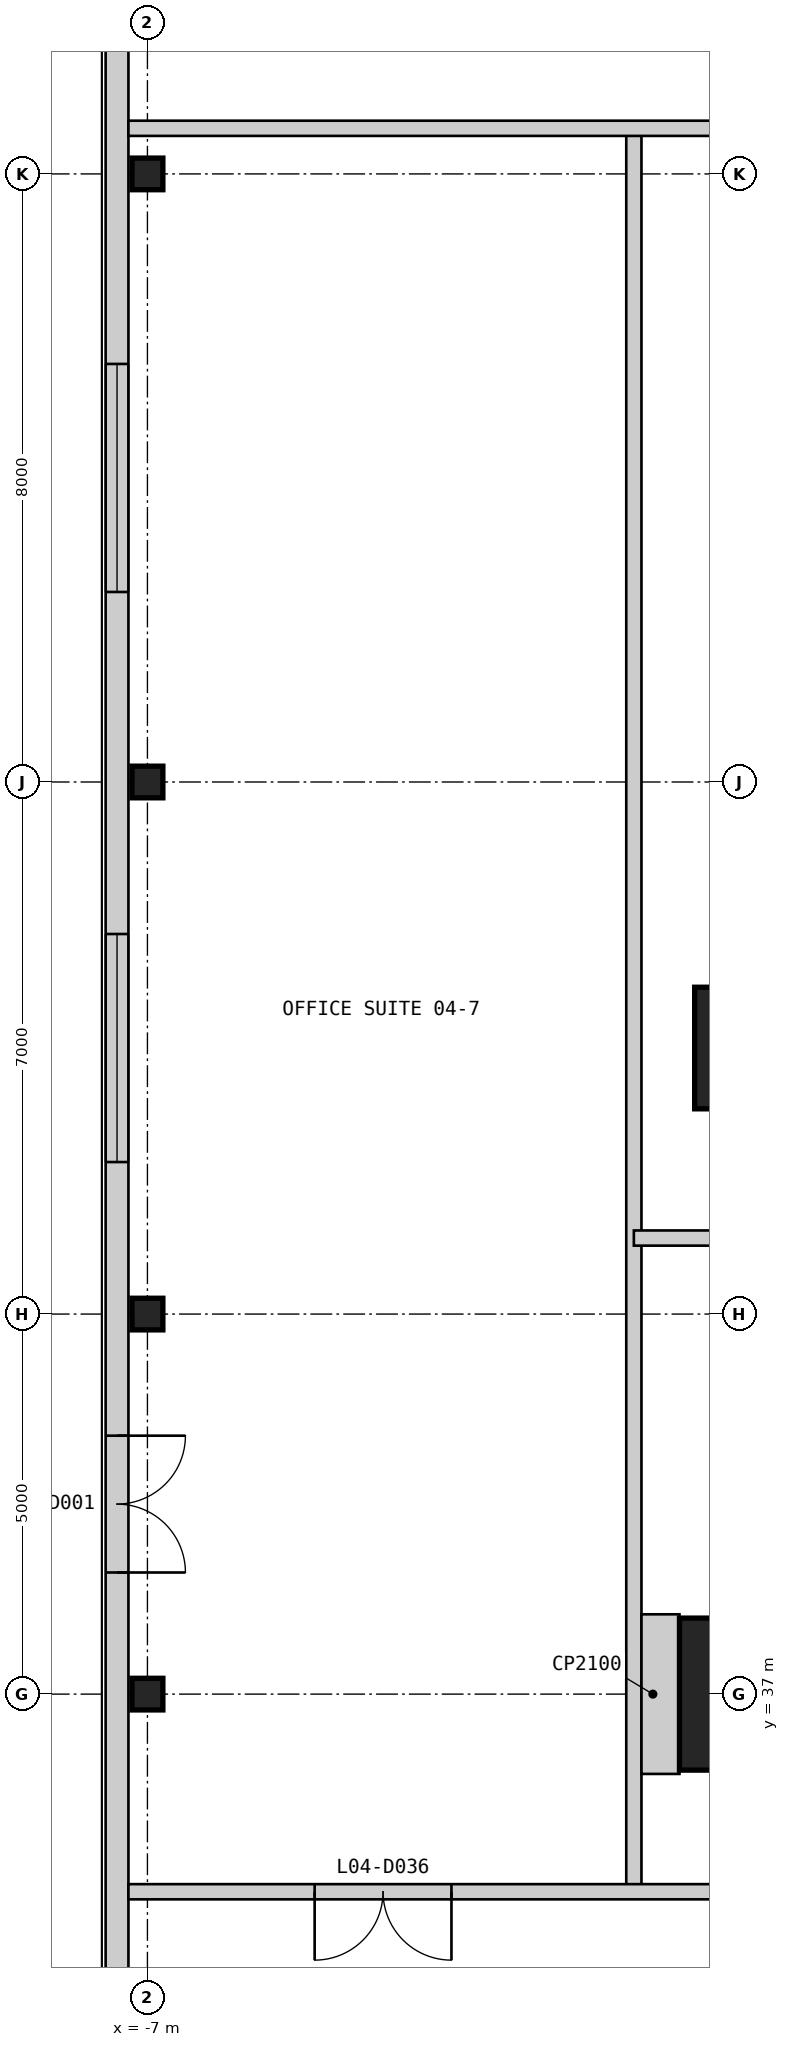
"""IFC4 building model, lengths in metres.
Left out: names, types, materials, properties, quantities, classifications, styles, units other than length and angle.
Written with IfcOpenShell. Run it as: python <this file> out.ifc"""

import sys

from ifc_helpers import new_model, si_unit, direction, frame, frame_2d, origin, origin_2d, place, context, subcontext, project, spatial, rectangle, i_section, extrude, element, fill, save


model = new_model("IFC4")
c1 = context("Model", 3, precision=1e-05, world=origin(), true_north=direction((0.0, 1.0)))
c2 = subcontext(c1, "Body", "Model", "MODEL_VIEW")
j1 = project(units=[si_unit("LENGTHUNIT", "METRE"), si_unit("PLANEANGLEUNIT", "RADIAN")], contexts=[c1])
p1 = place(None, origin())
s1 = spatial("IfcSite", under=j1, at=p1, CompositionType="ELEMENT")
p2 = place(p1, origin())
s2 = spatial("IfcBuilding", under=s1, at=p2, CompositionType="ELEMENT")
p3 = place(p2, frame((0.0, 0.0, 21.4)))
s3 = spatial("IfcBuildingStorey", under=s2, at=p3, CompositionType="ELEMENT", Elevation=21.4)
p4 = place(p3, frame((1.0, 45.5, 0.0), z_axis=(0.0, 0.0, 1.0), x_axis=(1.0, 0.0, 0.0)))
e1 = element("IfcColumn", 1, at=p4, inside=s3, PredefinedType="COLUMN", context=c2, shape_type="SweptSolid", body=[
    extrude(rectangle(XDim=1.6, YDim=1.6, at=origin_2d()), origin(), (0.0, 0.0, 1.0), 4.8),
])
p5 = place(p3, frame((1.0, 37.0, 0.0), z_axis=(0.0, 0.0, 1.0), x_axis=(1.0, 0.0, 0.0)))
e2 = element("IfcColumn", 2, at=p5, inside=s3, PredefinedType="COLUMN", context=c2, shape_type="SweptSolid", body=[
    extrude(rectangle(XDim=2.0, YDim=2.0, at=origin_2d()), origin(), (0.0, 0.0, 1.0), 4.8),
])
for number, where, z_axis, x_axis in (
    (3, (-7.0, 37.0, 0.0), (0.0, 0.0, 1.0), (1.0, 0.0, 0.0)),
    (4, (-7.0, 42.0, 0.0), (0.0, 0.0, 1.0), (1.0, 0.0, 0.0)),
    (5, (-7.0, 49.0, 0.0), (0.0, 0.0, 1.0), (1.0, 0.0, 0.0)),
    (6, (-7.0, 57.0, 0.0), (0.0, 0.0, 1.0), (1.0, 0.0, 0.0)),
):
    element("IfcColumn", number, at=place(p3, frame(where, z_axis=z_axis, x_axis=x_axis)), inside=s3, PredefinedType="COLUMN", context=c2, shape_type="SweptSolid", body=[
        extrude(i_section(OverallWidth=0.406, OverallDepth=0.417, WebThickness=0.03, FlangeThickness=0.048, at=origin_2d()), origin(), (0.0, 0.0, 1.0), 4.8),
    ])
p6 = place(p3, frame((-7.4, 65.25, 0.0), z_axis=(0.0, 0.0, 1.0), x_axis=(0.0, -1.0, 0.0)))
e7 = element("IfcWall", 7, at=p6, inside=s3, PredefinedType="SOLIDWALL", context=c2, shape_type="SweptSolid", body=[
    extrude(rectangle(XDim=72.5, YDim=0.3, at=frame_2d((36.25, 0.0))), origin(), (0.0, 0.0, 1.0), 4.5),
])
p7 = place(p6, frame((24.85, 0.0, 0.0)))
e8 = element("IfcOpeningElement", 8, at=p7, cuts=e7, PredefinedType="OPENING", context=c2, shape_type="SweptSolid", body=[
    extrude(rectangle(XDim=1.8, YDim=2.4, at=frame_2d((0.9, 1.2))), frame((0.0, 0.16, 0.0), z_axis=(0.0, -1.0, 0.0), x_axis=(1.0, 0.0, 0.0)), (0.0, 0.0, 1.0), 0.32),
])
p8 = place(p6, frame((59.85, 0.0, 0.0)))
e9 = element("IfcOpeningElement", 9, at=p8, cuts=e7, PredefinedType="OPENING", context=c2, shape_type="SweptSolid", body=[
    extrude(rectangle(XDim=1.8, YDim=2.4, at=frame_2d((0.9, 1.2))), frame((0.0, 0.16, 0.0), z_axis=(0.0, -1.0, 0.0), x_axis=(1.0, 0.0, 0.0)), (0.0, 0.0, 1.0), 0.32),
])
p9 = place(p6, frame((66.75, 0.0, 0.9)))
e10 = element("IfcOpeningElement", 10, at=p9, cuts=e7, PredefinedType="OPENING", context=c2, shape_type="SweptSolid", body=[
    extrude(rectangle(XDim=3.0, YDim=2.4, at=frame_2d((1.5, 1.2))), frame((0.0, 0.16, 0.0), z_axis=(0.0, -1.0, 0.0), x_axis=(1.0, 0.0, 0.0)), (0.0, 0.0, 1.0), 0.32),
])
p10 = place(p6, frame((44.75, 0.0, 0.9)))
e11 = element("IfcOpeningElement", 11, at=p10, cuts=e7, PredefinedType="OPENING", context=c2, shape_type="SweptSolid", body=[
    extrude(rectangle(XDim=3.0, YDim=2.4, at=frame_2d((1.5, 1.2))), frame((0.0, 0.16, 0.0), z_axis=(0.0, -1.0, 0.0), x_axis=(1.0, 0.0, 0.0)), (0.0, 0.0, 1.0), 0.32),
])
p11 = place(p6, frame((32.75, 0.0, 0.9)))
e12 = element("IfcOpeningElement", 12, at=p11, cuts=e7, PredefinedType="OPENING", context=c2, shape_type="SweptSolid", body=[
    extrude(rectangle(XDim=3.0, YDim=2.4, at=frame_2d((1.5, 1.2))), frame((0.0, 0.16, 0.0), z_axis=(0.0, -1.0, 0.0), x_axis=(1.0, 0.0, 0.0)), (0.0, 0.0, 1.0), 0.32),
])
p12 = place(p6, frame((18.25, 0.0, 0.9)))
e13 = element("IfcOpeningElement", 13, at=p12, cuts=e7, PredefinedType="OPENING", context=c2, shape_type="SweptSolid", body=[
    extrude(rectangle(XDim=3.0, YDim=2.4, at=frame_2d((1.5, 1.2))), frame((0.0, 0.16, 0.0), z_axis=(0.0, -1.0, 0.0), x_axis=(1.0, 0.0, 0.0)), (0.0, 0.0, 1.0), 0.32),
])
p13 = place(p6, frame((10.75, 0.0, 0.9)))
e14 = element("IfcOpeningElement", 14, at=p13, cuts=e7, PredefinedType="OPENING", context=c2, shape_type="SweptSolid", body=[
    extrude(rectangle(XDim=3.0, YDim=2.4, at=frame_2d((1.5, 1.2))), frame((0.0, 0.16, 0.0), z_axis=(0.0, -1.0, 0.0), x_axis=(1.0, 0.0, 0.0)), (0.0, 0.0, 1.0), 0.32),
])
p14 = place(p6, frame((2.75, 0.0, 0.9)))
e15 = element("IfcOpeningElement", 15, at=p14, cuts=e7, PredefinedType="OPENING", context=c2, shape_type="SweptSolid", body=[
    extrude(rectangle(XDim=3.0, YDim=2.4, at=frame_2d((1.5, 1.2))), frame((0.0, 0.16, 0.0), z_axis=(0.0, -1.0, 0.0), x_axis=(1.0, 0.0, 0.0)), (0.0, 0.0, 1.0), 0.32),
])
p15 = place(p3, frame((-0.6, 34.4, 0.0), z_axis=(0.0, 0.0, 1.0), x_axis=(0.0, 1.0, 0.0)))
e16 = element("IfcWall", 16, at=p15, inside=s3, PredefinedType="PARTITIONING", context=c2, shape_type="SweptSolid", body=[
    extrude(rectangle(XDim=23.2, YDim=0.2, at=frame_2d((11.6, 0.0))), origin(), (0.0, 0.0, 1.0), 4.5),
])
p16 = place(p3, frame((-7.25, 34.4, 0.0), z_axis=(0.0, 0.0, 1.0), x_axis=(1.0, 0.0, 0.0)))
e17 = element("IfcWall", 17, at=p16, inside=s3, PredefinedType="PARTITIONING", context=c2, shape_type="SweptSolid", body=[
    extrude(rectangle(XDim=14.25, YDim=0.2, at=frame_2d((7.125, 0.0))), origin(), (0.0, 0.0, 1.0), 4.5),
])
p17 = place(p16, frame((9.525, 0.0, 0.0)))
e18 = element("IfcOpeningElement", 18, at=p17, cuts=e17, PredefinedType="OPENING", context=c2, shape_type="SweptSolid", body=[
    extrude(rectangle(XDim=1.8, YDim=2.4, at=frame_2d((0.9, 1.2))), frame((0.0, 0.11, 0.0), z_axis=(0.0, -1.0, 0.0), x_axis=(1.0, 0.0, 0.0)), (0.0, 0.0, 1.0), 0.22),
])
p18 = place(p16, frame((2.45, 0.0, 0.0)))
e19 = element("IfcOpeningElement", 19, at=p18, cuts=e17, PredefinedType="OPENING", context=c2, shape_type="SweptSolid", body=[
    extrude(rectangle(XDim=1.8, YDim=2.4, at=frame_2d((0.9, 1.2))), frame((0.0, 0.11, 0.0), z_axis=(0.0, -1.0, 0.0), x_axis=(1.0, 0.0, 0.0)), (0.0, 0.0, 1.0), 0.22),
])
p19 = place(p3, frame((-0.6, 43.0, 0.0), z_axis=(0.0, 0.0, 1.0), x_axis=(1.0, 0.0, 0.0)))
e20 = element("IfcWall", 20, at=p19, inside=s3, PredefinedType="PARTITIONING", context=c2, shape_type="SweptSolid", body=[
    extrude(rectangle(XDim=14.6, YDim=0.2, at=frame_2d((7.3, 0.0))), origin(), (0.0, 0.0, 1.0), 4.5),
])
p20 = place(p3, frame((-7.25, 57.6, 0.0), z_axis=(0.0, 0.0, 1.0), x_axis=(1.0, 0.0, 0.0)))
e21 = element("IfcWall", 21, at=p20, inside=s3, PredefinedType="PARTITIONING", context=c2, shape_type="SweptSolid", body=[
    extrude(rectangle(XDim=18.85, YDim=0.2, at=frame_2d((9.425, 0.0))), origin(), (0.0, 0.0, 1.0), 4.5),
])
p21 = place(p3, frame((-0.5, 37.0, 0.0), z_axis=(0.0, 0.0, 1.0), x_axis=(1.0, 0.0, 0.0)))
e22 = element("IfcWall", 22, at=p21, inside=s3, PredefinedType="PARTITIONING", context=c2, shape_type="SweptSolid", body=[
    extrude(rectangle(XDim=0.5, YDim=2.1, at=frame_2d((0.25, 0.0))), origin(), (0.0, 0.0, 1.0), 4.5),
])
p22 = place(p7, origin())
e23 = element("IfcDoor", 23, at=p22, inside=s3, OperationType="DOUBLE_DOOR_SINGLE_SWING", PredefinedType="DOOR", context=c2, shape_type="SweptSolid", body=[
    extrude(rectangle(XDim=1.8, YDim=2.4, at=frame_2d((0.9, 1.2))), frame((0.0, 0.025, 0.0), z_axis=(0.0, -1.0, 0.0), x_axis=(1.0, 0.0, 0.0)), (0.0, 0.0, 1.0), 0.05),
])
fill(e8, e23)
p23 = place(p12, origin())
e24 = element("IfcWindow", 24, at=p23, inside=s3, PartitioningType="SINGLE_PANEL", PredefinedType="WINDOW", context=c2, shape_type="SweptSolid", body=[
    extrude(rectangle(XDim=3.0, YDim=2.4, at=frame_2d((1.5, 1.2))), frame((0.0, 0.03, 0.0), z_axis=(0.0, -1.0, 0.0), x_axis=(1.0, 0.0, 0.0)), (0.0, 0.0, 1.0), 0.06),
])
fill(e13, e24)
p24 = place(p13, origin())
e25 = element("IfcWindow", 25, at=p24, inside=s3, PartitioningType="SINGLE_PANEL", PredefinedType="WINDOW", context=c2, shape_type="SweptSolid", body=[
    extrude(rectangle(XDim=3.0, YDim=2.4, at=frame_2d((1.5, 1.2))), frame((0.0, 0.03, 0.0), z_axis=(0.0, -1.0, 0.0), x_axis=(1.0, 0.0, 0.0)), (0.0, 0.0, 1.0), 0.06),
])
fill(e14, e25)
p25 = place(p18, frame((1.8, 0.0, 0.0), z_axis=(0.0, 0.0, 1.0), x_axis=(-1.0, 0.0, 0.0)))
e26 = element("IfcDoor", 26, at=p25, inside=s3, OperationType="DOUBLE_DOOR_SINGLE_SWING", PredefinedType="DOOR", context=c2, shape_type="SweptSolid", body=[
    extrude(rectangle(XDim=1.8, YDim=2.4, at=frame_2d((0.9, 1.2))), frame((0.0, 0.025, 0.0), z_axis=(0.0, -1.0, 0.0), x_axis=(1.0, 0.0, 0.0)), (0.0, 0.0, 1.0), 0.05),
])
fill(e19, e26)
save(model, sys.argv[1])
